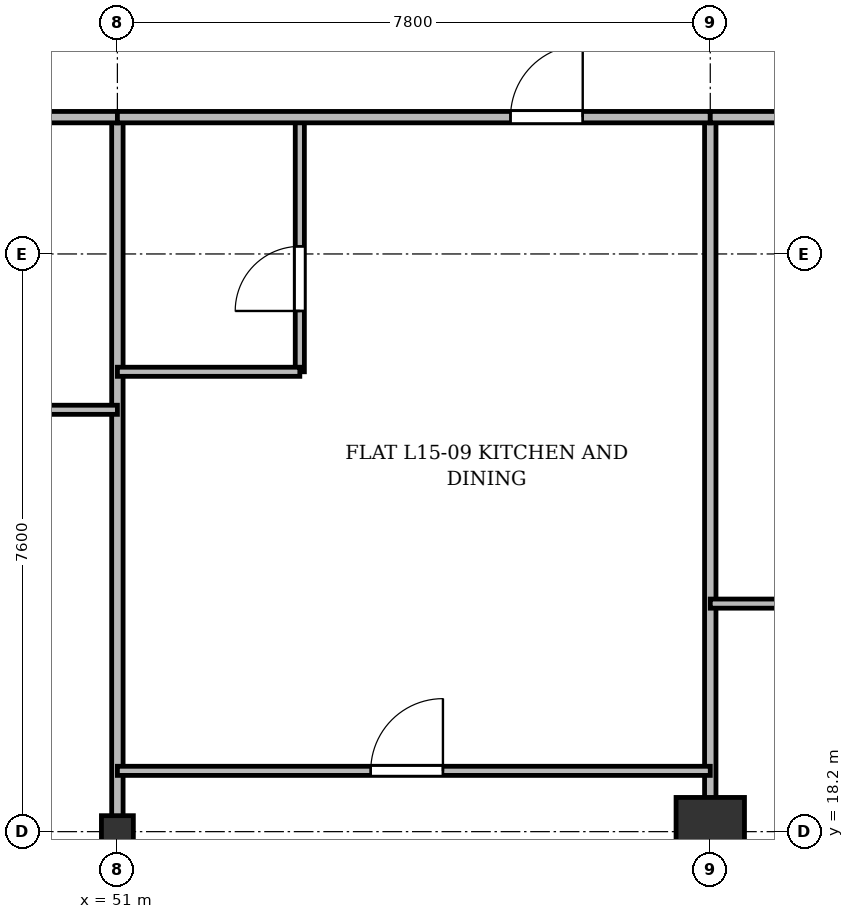
"""IFC4 building model, lengths in metres.
Left out: names, types, materials, properties, quantities, classifications, styles, units other than length and angle.
Written with IfcOpenShell. Run it as: python <this file> out.ifc"""

import sys

from ifc_helpers import new_model, si_unit, direction, frame, frame_2d, origin, origin_2d, place, context, subcontext, project, spatial, rectangle, i_section, extrude, source, transform, mapped, element, fill, save


model = new_model("IFC4")
c1 = context("Model", 3, precision=1e-05, world=origin(), true_north=direction((0.0, 1.0)))
c2 = subcontext(c1, "Body", "Model", "MODEL_VIEW")
j1 = project(units=[si_unit("LENGTHUNIT", "METRE"), si_unit("PLANEANGLEUNIT", "RADIAN")], contexts=[c1])
p1 = place(None, origin())
s1 = spatial("IfcSite", under=j1, at=p1, CompositionType="ELEMENT")
p2 = place(p1, origin())
s2 = spatial("IfcBuilding", under=s1, at=p2, CompositionType="ELEMENT")
p3 = place(p2, frame((0.0, 0.0, 59.5)))
s3 = spatial("IfcBuildingStorey", under=s2, at=p3, CompositionType="ELEMENT", Elevation=59.5)
m1 = source(origin(), c2, "Body", "SweptSolid", [
    extrude(i_section(OverallWidth=0.42, OverallDepth=0.42, WebThickness=0.026, FlangeThickness=0.04, at=origin_2d()), origin(), (0.0, 0.0, 1.0), 3.6),
])
p4 = place(p3, frame((51.0, 18.2, 0.0), z_axis=(0.0, 0.0, 1.0), x_axis=(1.0, 0.0, 0.0)))
e1 = element("IfcColumn", 1, at=p4, inside=s3, PredefinedType="COLUMN", context=c2, shape_type="MappedRepresentation", body=[
    mapped(m1, transform((0.0, 0.0, 0.0), x_axis=(1.0, 0.0, 0.0), y_axis=(0.0, 1.0, 0.0), z_axis=(0.0, 0.0, 1.0), scale=1.0)),
])
m2 = source(origin(), c2, "Body", "SweptSolid", [
    extrude(rectangle(XDim=0.9, YDim=0.9, at=origin_2d()), origin(), (0.0, 0.0, 1.0), 3.6),
])
p5 = place(p3, frame((58.8, 18.2, 0.0), z_axis=(0.0, 0.0, 1.0), x_axis=(1.0, 0.0, 0.0)))
e2 = element("IfcColumn", 2, at=p5, inside=s3, PredefinedType="COLUMN", context=c2, shape_type="MappedRepresentation", body=[
    mapped(m2, transform((0.0, 0.0, 0.0), x_axis=(1.0, 0.0, 0.0), y_axis=(0.0, 1.0, 0.0), z_axis=(0.0, 0.0, 1.0), scale=1.0)),
])
for number, where, z_axis, x_axis in (
    (3, (51.0, 3.145, 0.0), (0.0, 0.0, 1.0), (0.0, 1.0, 0.0)),
    (4, (58.8, 3.145, 0.0), (0.0, 0.0, 1.0), (0.0, 1.0, 0.0)),
):
    element("IfcWall", number, at=place(p3, frame(where, z_axis=z_axis, x_axis=x_axis)), inside=s3, PredefinedType="PARTITIONING", context=c2, shape_type="SweptSolid", body=[
        extrude(rectangle(XDim=24.455, YDim=0.15, at=frame_2d((12.228, 0.0))), origin(), (0.0, 0.0, 1.0), 2.752),
    ])
p6 = place(p3, frame((43.8, 27.6, 0.0), z_axis=(0.0, 0.0, 1.0), x_axis=(1.0, 0.0, 0.0)))
e5 = element("IfcWall", 5, at=p6, inside=s3, PredefinedType="PARTITIONING", context=c2, shape_type="SweptSolid", body=[
    extrude(rectangle(XDim=7.2, YDim=0.15, at=frame_2d((3.6, 0.0))), origin(), (0.0, 0.0, 1.0), 2.752),
])
p7 = place(p6, frame((3.125, 0.0, 0.0)))
e6 = element("IfcOpeningElement", 6, at=p7, cuts=e5, PredefinedType="OPENING", context=c2, shape_type="SweptSolid", body=[
    extrude(rectangle(XDim=0.95, YDim=2.15, at=frame_2d((0.475, 1.075))), frame((0.0, 0.085, 0.0), z_axis=(0.0, -1.0, 0.0), x_axis=(1.0, 0.0, 0.0)), (0.0, 0.0, 1.0), 0.17),
])
p8 = place(p3, frame((43.8, 23.75, 0.0), z_axis=(0.0, 0.0, 1.0), x_axis=(1.0, 0.0, 0.0)))
e7 = element("IfcWall", 7, at=p8, inside=s3, PredefinedType="PARTITIONING", context=c2, shape_type="SweptSolid", body=[
    extrude(rectangle(XDim=7.2, YDim=0.12, at=frame_2d((3.6, 0.0))), origin(), (0.0, 0.0, 1.0), 2.752),
])
p9 = place(p8, frame((3.125, 0.0, 0.0)))
e8 = element("IfcOpeningElement", 8, at=p9, cuts=e7, PredefinedType="OPENING", context=c2, shape_type="SweptSolid", body=[
    extrude(rectangle(XDim=0.95, YDim=2.15, at=frame_2d((0.475, 1.075))), frame((0.0, 0.07, 0.0), z_axis=(0.0, -1.0, 0.0), x_axis=(1.0, 0.0, 0.0)), (0.0, 0.0, 1.0), 0.14),
])
p10 = place(p3, frame((51.0, 19.0, 0.0), z_axis=(0.0, 0.0, 1.0), x_axis=(1.0, 0.0, 0.0)))
e9 = element("IfcWall", 9, at=p10, inside=s3, PredefinedType="PARTITIONING", context=c2, shape_type="SweptSolid", body=[
    extrude(rectangle(XDim=7.8, YDim=0.12, at=frame_2d((3.9, 0.0))), origin(), (0.0, 0.0, 1.0), 2.752),
])
p11 = place(p10, frame((3.333, 0.0, 0.0)))
e10 = element("IfcOpeningElement", 10, at=p11, cuts=e9, PredefinedType="OPENING", context=c2, shape_type="SweptSolid", body=[
    extrude(rectangle(XDim=0.95, YDim=2.15, at=frame_2d((0.475, 1.075))), frame((0.0, 0.07, 0.0), z_axis=(0.0, -1.0, 0.0), x_axis=(1.0, 0.0, 0.0)), (0.0, 0.0, 1.0), 0.14),
])
p12 = place(p3, frame((53.4, 24.25, 0.0), z_axis=(0.0, 0.0, 1.0), x_axis=(0.0, 1.0, 0.0)))
e11 = element("IfcWall", 11, at=p12, inside=s3, PredefinedType="PARTITIONING", context=c2, shape_type="SweptSolid", body=[
    extrude(rectangle(XDim=3.35, YDim=0.12, at=frame_2d((1.675, 0.0))), origin(), (0.0, 0.0, 1.0), 2.94),
])
p13 = place(p12, frame((0.8, 0.0, 0.0)))
e12 = element("IfcOpeningElement", 12, at=p13, cuts=e11, PredefinedType="OPENING", context=c2, shape_type="SweptSolid", body=[
    extrude(rectangle(XDim=0.85, YDim=2.1, at=frame_2d((0.425, 1.05))), frame((0.0, 0.07, 0.0), z_axis=(0.0, -1.0, 0.0), x_axis=(1.0, 0.0, 0.0)), (0.0, 0.0, 1.0), 0.14),
])
p14 = place(p3, frame((51.0, 24.25, 0.0), z_axis=(0.0, 0.0, 1.0), x_axis=(1.0, 0.0, 0.0)))
e13 = element("IfcWall", 13, at=p14, inside=s3, PredefinedType="PARTITIONING", context=c2, shape_type="SweptSolid", body=[
    extrude(rectangle(XDim=2.4, YDim=0.12, at=frame_2d((1.2, 0.0))), origin(), (0.0, 0.0, 1.0), 2.752),
])
p15 = place(p3, frame((51.0, 27.6, 0.0), z_axis=(0.0, 0.0, 1.0), x_axis=(1.0, 0.0, 0.0)))
e14 = element("IfcWall", 14, at=p15, inside=s3, PredefinedType="PARTITIONING", context=c2, shape_type="SweptSolid", body=[
    extrude(rectangle(XDim=7.8, YDim=0.15, at=frame_2d((3.9, 0.0))), origin(), (0.0, 0.0, 1.0), 2.752),
])
p16 = place(p15, frame((5.172, 0.0, 0.0)))
e15 = element("IfcOpeningElement", 15, at=p16, cuts=e14, PredefinedType="OPENING", context=c2, shape_type="SweptSolid", body=[
    extrude(rectangle(XDim=0.95, YDim=2.15, at=frame_2d((0.475, 1.075))), frame((0.0, 0.085, 0.0), z_axis=(0.0, -1.0, 0.0), x_axis=(1.0, 0.0, 0.0)), (0.0, 0.0, 1.0), 0.17),
])
p17 = place(p3, frame((58.8, 27.6, 0.0), z_axis=(0.0, 0.0, 1.0), x_axis=(1.0, 0.0, 0.0)))
e16 = element("IfcWall", 16, at=p17, inside=s3, PredefinedType="PARTITIONING", context=c2, shape_type="SweptSolid", body=[
    extrude(rectangle(XDim=6.8, YDim=0.15, at=frame_2d((3.4, 0.0))), origin(), (0.0, 0.0, 1.0), 2.752),
])
p18 = place(p17, frame((2.925, 0.0, 0.0)))
e17 = element("IfcOpeningElement", 17, at=p18, cuts=e16, PredefinedType="OPENING", context=c2, shape_type="SweptSolid", body=[
    extrude(rectangle(XDim=0.95, YDim=2.15, at=frame_2d((0.475, 1.075))), frame((0.0, 0.085, 0.0), z_axis=(0.0, -1.0, 0.0), x_axis=(1.0, 0.0, 0.0)), (0.0, 0.0, 1.0), 0.17),
])
p19 = place(p3, frame((58.8, 21.2, 0.0), z_axis=(0.0, 0.0, 1.0), x_axis=(1.0, 0.0, 0.0)))
e18 = element("IfcWall", 18, at=p19, inside=s3, PredefinedType="PARTITIONING", context=c2, shape_type="SweptSolid", body=[
    extrude(rectangle(XDim=6.8, YDim=0.12, at=frame_2d((3.4, 0.0))), origin(), (0.0, 0.0, 1.0), 2.752),
])
p20 = place(p19, frame((2.925, 0.0, 0.0)))
e19 = element("IfcOpeningElement", 19, at=p20, cuts=e18, PredefinedType="OPENING", context=c2, shape_type="SweptSolid", body=[
    extrude(rectangle(XDim=0.95, YDim=2.15, at=frame_2d((0.475, 1.075))), frame((0.0, 0.07, 0.0), z_axis=(0.0, -1.0, 0.0), x_axis=(1.0, 0.0, 0.0)), (0.0, 0.0, 1.0), 0.14),
])
m3 = source(origin(), c2, "Body", "SweptSolid", [
    extrude(rectangle(XDim=0.95, YDim=2.15, at=frame_2d((0.475, 1.075))), frame((0.0, 0.025, 0.0), z_axis=(0.0, -1.0, 0.0), x_axis=(1.0, 0.0, 0.0)), (0.0, 0.0, 1.0), 0.05),
])
p21 = place(p11, origin())
e20 = element("IfcDoor", 20, at=p21, inside=s3, OperationType="SINGLE_SWING_RIGHT", PredefinedType="DOOR", context=c2, shape_type="MappedRepresentation", body=[
    mapped(m3, transform((0.0, 0.0, 0.0), x_axis=(1.0, 0.0, 0.0), y_axis=(0.0, 1.0, 0.0), z_axis=(0.0, 0.0, 1.0), scale=1.0)),
])
fill(e10, e20)
m4 = source(origin(), c2, "Body", "SweptSolid", [
    extrude(rectangle(XDim=0.85, YDim=2.1, at=frame_2d((0.425, 1.05))), frame((0.0, 0.025, 0.0), z_axis=(0.0, -1.0, 0.0), x_axis=(1.0, 0.0, 0.0)), (0.0, 0.0, 1.0), 0.05),
])
p22 = place(p13, origin())
e21 = element("IfcDoor", 21, at=p22, inside=s3, OperationType="SINGLE_SWING_LEFT", PredefinedType="DOOR", context=c2, shape_type="MappedRepresentation", body=[
    mapped(m4, transform((0.0, 0.0, 0.0), x_axis=(1.0, 0.0, 0.0), y_axis=(0.0, 1.0, 0.0), z_axis=(0.0, 0.0, 1.0), scale=1.0)),
])
fill(e12, e21)
p23 = place(p16, origin())
e22 = element("IfcDoor", 22, at=p23, inside=s3, OperationType="SINGLE_SWING_RIGHT", PredefinedType="DOOR", context=c2, shape_type="MappedRepresentation", body=[
    mapped(m3, transform((0.0, 0.0, 0.0), x_axis=(1.0, 0.0, 0.0), y_axis=(0.0, 1.0, 0.0), z_axis=(0.0, 0.0, 1.0), scale=1.0)),
])
fill(e15, e22)
save(model, sys.argv[1])
